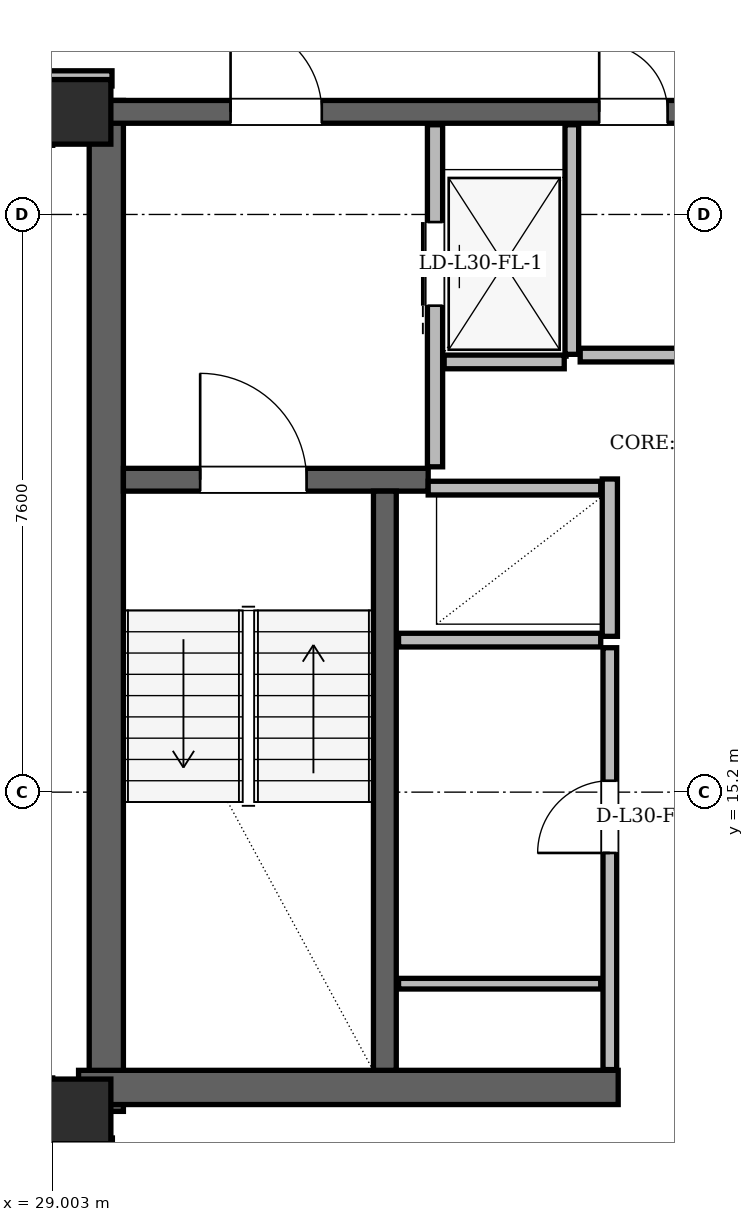
"""IFC4 building model, lengths in metres.
Left out: names, types, materials, properties, quantities, classifications, styles, units other than length and angle.
Written with IfcOpenShell. Run it as: python <this file> out.ifc"""

import sys

from ifc_helpers import new_model, si_unit, direction, frame, frame_2d, origin, origin_2d, place, context, subcontext, project, spatial, rectangle, hollow_rectangle, extrude, element, fill, save


model = new_model("IFC4")
c1 = context("Model", 3, precision=1e-05, world=origin(), true_north=direction((0.0, 1.0)))
c2 = subcontext(c1, "Body", "Model", "MODEL_VIEW")
j1 = project(units=[si_unit("LENGTHUNIT", "METRE"), si_unit("PLANEANGLEUNIT", "RADIAN")], contexts=[c1])
p1 = place(None, origin())
s1 = spatial("IfcSite", under=j1, at=p1, CompositionType="ELEMENT")
p2 = place(p1, origin())
s2 = spatial("IfcBuilding", under=s1, at=p2, CompositionType="ELEMENT")
p3 = place(p2, frame((0.0, 0.0, 115.8)))
s3 = spatial("IfcBuildingStorey", under=s2, at=p3, CompositionType="ELEMENT", Elevation=115.8)
for number, where, z_axis, x_axis in (
    (1, (29.35, 11.0, 0.0), (0.0, 0.0, 1.0), (1.0, 0.0, 0.0)),
    (2, (29.35, 24.15, 0.0), (0.0, 0.0, 1.0), (1.0, 0.0, 0.0)),
):
    element("IfcColumn", number, at=place(p3, frame(where, z_axis=z_axis, x_axis=x_axis)), inside=s3, PredefinedType="COLUMN", context=c2, shape_type="SweptSolid", body=[
        extrude(hollow_rectangle(XDim=0.85, YDim=0.85, WallThickness=0.07, at=origin_2d()), origin(), (0.0, 0.0, 1.0), 3.6),
    ])
p4 = place(p3, frame((29.715, 11.0, 0.0), z_axis=(0.0, 0.0, 1.0), x_axis=(0.0, 1.0, 0.0)))
e3 = element("IfcWall", 3, at=p4, inside=s3, PredefinedType="SHEAR", context=c2, shape_type="SweptSolid", body=[
    extrude(rectangle(XDim=13.3, YDim=0.45, at=frame_2d((6.65, 0.0))), origin(), (0.0, 0.0, 1.0), 3.36),
])
p5 = place(p3, frame((29.35, 11.315, 0.0), z_axis=(0.0, 0.0, 1.0), x_axis=(1.0, 0.0, 0.0)))
e4 = element("IfcWall", 4, at=p5, inside=s3, PredefinedType="SHEAR", context=c2, shape_type="SweptSolid", body=[
    extrude(rectangle(XDim=7.1, YDim=0.45, at=frame_2d((3.55, 0.0))), origin(), (0.0, 0.0, 1.0), 3.36),
])
p6 = place(p3, frame((29.65, 24.15, 0.0), z_axis=(0.0, 0.0, 1.0), x_axis=(1.0, 0.0, 0.0)))
e5 = element("IfcWall", 5, at=p6, inside=s3, PredefinedType="SHEAR", context=c2, shape_type="SweptSolid", body=[
    extrude(rectangle(XDim=15.7, YDim=0.3, at=frame_2d((7.85, 0.0))), origin(), (0.0, 0.0, 1.0), 3.36),
])
p7 = place(p6, frame((1.7, 0.0, 0.0)))
e6 = element("IfcOpeningElement", 6, at=p7, cuts=e5, PredefinedType="OPENING", context=c2, shape_type="SweptSolid", body=[
    extrude(rectangle(XDim=1.2, YDim=2.2, at=frame_2d((0.6, 1.1))), frame((0.0, 0.15, 0.0), z_axis=(0.0, -1.0, 0.0), x_axis=(1.0, 0.0, 0.0)), (0.0, 0.0, 1.0), 0.3),
])
p8 = place(p6, frame((12.8, 0.0, 0.0)))
e7 = element("IfcOpeningElement", 7, at=p8, cuts=e5, PredefinedType="OPENING", context=c2, shape_type="SweptSolid", body=[
    extrude(rectangle(XDim=1.2, YDim=2.2, at=frame_2d((0.6, 1.1))), frame((0.0, 0.15, 0.0), z_axis=(0.0, -1.0, 0.0), x_axis=(1.0, 0.0, 0.0)), (0.0, 0.0, 1.0), 0.3),
])
p9 = place(p6, frame((6.55, 0.0, 0.0)))
e8 = element("IfcOpeningElement", 8, at=p9, cuts=e5, PredefinedType="OPENING", context=c2, shape_type="SweptSolid", body=[
    extrude(rectangle(XDim=0.9, YDim=2.05, at=frame_2d((0.45, 1.025))), frame((0.0, 0.15, 0.0), z_axis=(0.0, -1.0, 0.0), x_axis=(1.0, 0.0, 0.0)), (0.0, 0.0, 1.0), 0.3),
])
p10 = place(p6, frame((8.45, 0.0, 0.0)))
e9 = element("IfcOpeningElement", 9, at=p10, cuts=e5, PredefinedType="OPENING", context=c2, shape_type="SweptSolid", body=[
    extrude(rectangle(XDim=0.9, YDim=2.05, at=frame_2d((0.45, 1.025))), frame((0.0, 0.15, 0.0), z_axis=(0.0, -1.0, 0.0), x_axis=(1.0, 0.0, 0.0)), (0.0, 0.0, 1.0), 0.3),
])
p11 = place(p3, frame((29.94, 19.31, 0.0), z_axis=(0.0, 0.0, 1.0), x_axis=(1.0, 0.0, 0.0)))
e10 = element("IfcWall", 10, at=p11, inside=s3, PredefinedType="SHEAR", context=c2, shape_type="SweptSolid", body=[
    extrude(rectangle(XDim=4.01, YDim=0.3, at=frame_2d((2.005, 0.0))), origin(), (0.0, 0.0, 1.0), 3.36),
])
p12 = place(p11, frame((1.01, 0.0, 0.0)))
e11 = element("IfcOpeningElement", 11, at=p12, cuts=e10, PredefinedType="OPENING", context=c2, shape_type="SweptSolid", body=[
    extrude(rectangle(XDim=1.4, YDim=2.2, at=frame_2d((0.7, 1.1))), frame((0.0, 0.15, 0.0), z_axis=(0.0, -1.0, 0.0), x_axis=(1.0, 0.0, 0.0)), (0.0, 0.0, 1.0), 0.3),
])
p13 = place(p3, frame((33.38, 11.54, 0.0), z_axis=(0.0, 0.0, 1.0), x_axis=(0.0, 1.0, 0.0)))
e12 = element("IfcWall", 12, at=p13, inside=s3, PredefinedType="SHEAR", context=c2, shape_type="SweptSolid", body=[
    extrude(rectangle(XDim=7.62, YDim=0.3, at=frame_2d((3.81, 0.0))), origin(), (0.0, 0.0, 1.0), 3.36),
])
p14 = place(p3, frame((34.04, 19.48, 0.0), z_axis=(0.0, 0.0, 1.0), x_axis=(0.0, 1.0, 0.0)))
e13 = element("IfcWall", 13, at=p14, inside=s3, PredefinedType="PARTITIONING", context=c2, shape_type="SweptSolid", body=[
    extrude(rectangle(XDim=4.5, YDim=0.2, at=frame_2d((2.25, 0.0))), origin(), (0.0, 0.0, 1.0), 2.4),
])
p15 = place(p14, frame((2.12, 0.0, 0.0)))
e14 = element("IfcOpeningElement", 14, at=p15, cuts=e13, PredefinedType="OPENING", context=c2, shape_type="SweptSolid", body=[
    extrude(rectangle(XDim=1.1, YDim=2.2, at=frame_2d((0.55, 1.1))), frame((0.0, 0.1, 0.0), z_axis=(0.0, -1.0, 0.0), x_axis=(1.0, 0.0, 0.0)), (0.0, 0.0, 1.0), 0.2),
])
p16 = place(p3, frame((35.84, 20.96, 0.0), z_axis=(0.0, 0.0, 1.0), x_axis=(0.0, 1.0, 0.0)))
e15 = element("IfcWall", 15, at=p16, inside=s3, PredefinedType="PARTITIONING", context=c2, shape_type="SweptSolid", body=[
    extrude(rectangle(XDim=3.02, YDim=0.18, at=frame_2d((1.51, 0.0))), origin(), (0.0, 0.0, 1.0), 2.4),
])
p17 = place(p3, frame((34.16, 20.86, 0.0), z_axis=(0.0, 0.0, 1.0), x_axis=(1.0, 0.0, 0.0)))
e16 = element("IfcWall", 16, at=p17, inside=s3, PredefinedType="PARTITIONING", context=c2, shape_type="SweptSolid", body=[
    extrude(rectangle(XDim=1.58, YDim=0.18, at=frame_2d((0.79, 0.0))), origin(), (0.0, 0.0, 1.0), 3.36),
])
p18 = place(p3, frame((36.34, 17.25, 0.0), z_axis=(0.0, 0.0, 1.0), x_axis=(0.0, 1.0, 0.0)))
e17 = element("IfcWall", 17, at=p18, inside=s3, PredefinedType="PARTITIONING", context=c2, shape_type="SweptSolid", body=[
    extrude(rectangle(XDim=2.07, YDim=0.2, at=frame_2d((1.035, 0.0))), origin(), (0.0, 0.0, 1.0), 3.36),
])
p19 = place(p3, frame((33.95, 19.2, 0.0), z_axis=(0.0, 0.0, 1.0), x_axis=(1.0, 0.0, 0.0)))
e18 = element("IfcWall", 18, at=p19, inside=s3, PredefinedType="PARTITIONING", context=c2, shape_type="SweptSolid", body=[
    extrude(rectangle(XDim=2.27, YDim=0.18, at=frame_2d((1.135, 0.0))), origin(), (0.0, 0.0, 1.0), 3.36),
])
p20 = place(p3, frame((33.56, 17.2, 0.0), z_axis=(0.0, 0.0, 1.0), x_axis=(1.0, 0.0, 0.0)))
e19 = element("IfcWall", 19, at=p20, inside=s3, PredefinedType="PARTITIONING", context=c2, shape_type="SweptSolid", body=[
    extrude(rectangle(XDim=2.66, YDim=0.18, at=frame_2d((1.33, 0.0))), origin(), (0.0, 0.0, 1.0), 3.36),
])
p21 = place(p3, frame((36.34, 11.55, 0.0), z_axis=(0.0, 0.0, 1.0), x_axis=(0.0, 1.0, 0.0)))
e20 = element("IfcWall", 20, at=p21, inside=s3, PredefinedType="PARTITIONING", context=c2, shape_type="SweptSolid", body=[
    extrude(rectangle(XDim=5.55, YDim=0.18, at=frame_2d((2.775, 0.0))), origin(), (0.0, 0.0, 1.0), 3.36),
])
p22 = place(p21, frame((2.85, 0.0, 0.0)))
e21 = element("IfcOpeningElement", 21, at=p22, cuts=e20, PredefinedType="OPENING", context=c2, shape_type="SweptSolid", body=[
    extrude(rectangle(XDim=0.95, YDim=2.1, at=frame_2d((0.475, 1.05))), frame((0.0, 0.09, 0.0), z_axis=(0.0, -1.0, 0.0), x_axis=(1.0, 0.0, 0.0)), (0.0, 0.0, 1.0), 0.18),
])
p23 = place(p3, frame((33.56, 12.68, 0.0), z_axis=(0.0, 0.0, 1.0), x_axis=(1.0, 0.0, 0.0)))
e22 = element("IfcWall", 22, at=p23, inside=s3, PredefinedType="PARTITIONING", context=c2, shape_type="SweptSolid", body=[
    extrude(rectangle(XDim=2.66, YDim=0.14, at=frame_2d((1.33, 0.0))), origin(), (0.0, 0.0, 1.0), 3.36),
])
p24 = place(p3, frame((35.95, 20.95, 0.0), z_axis=(0.0, 0.0, 1.0), x_axis=(1.0, 0.0, 0.0)))
e23 = element("IfcWall", 23, at=p24, inside=s3, PredefinedType="PARTITIONING", context=c2, shape_type="SweptSolid", body=[
    extrude(rectangle(XDim=3.1, YDim=0.18, at=frame_2d((1.55, 0.0))), origin(), (0.0, 0.0, 1.0), 3.36),
])
p25 = place(p3, frame((28.905, 10.55, 0.0), z_axis=(0.0, 0.0, 1.0), x_axis=(1.0, 0.0, 0.0)))
e24 = element("IfcWall", 24, at=p25, inside=s3, PredefinedType="PARTITIONING", context=c2, shape_type="SweptSolid", body=[
    extrude(rectangle(XDim=0.89, YDim=0.2, at=frame_2d((0.445, 0.0))), origin(), (0.0, 0.0, 1.0), 3.36),
])
p26 = place(p3, frame((28.91, 24.59, 0.0), z_axis=(0.0, 0.0, 1.0), x_axis=(1.0, 0.0, 0.0)))
e25 = element("IfcWall", 25, at=p26, inside=s3, PredefinedType="PARTITIONING", context=c2, shape_type="SweptSolid", body=[
    extrude(rectangle(XDim=0.88, YDim=0.2, at=frame_2d((0.44, 0.0))), origin(), (0.0, 0.0, 1.0), 2.814),
])
p27 = place(p3, frame((28.91, 10.654, 0.0), z_axis=(0.0, 0.0, 1.0), x_axis=(0.0, 1.0, 0.0)))
e26 = element("IfcWall", 26, at=p27, inside=s3, PredefinedType="PARTITIONING", context=c2, shape_type="SweptSolid", body=[
    extrude(rectangle(XDim=0.786, YDim=0.2, at=frame_2d((0.393, 0.0))), origin(), (0.0, 0.0, 1.0), 2.814),
])
p28 = place(p3, frame((28.91, 23.71, 0.0), z_axis=(0.0, 0.0, 1.0), x_axis=(0.0, 1.0, 0.0)))
e27 = element("IfcWall", 27, at=p28, inside=s3, PredefinedType="PARTITIONING", context=c2, shape_type="SweptSolid", body=[
    extrude(rectangle(XDim=0.61, YDim=0.2, at=frame_2d((0.305, 0.0))), origin(), (0.0, 0.0, 1.0), 3.36),
])
p29 = place(p22, origin())
e28 = element("IfcDoor", 28, at=p29, inside=s3, OperationType="SINGLE_SWING_LEFT", PredefinedType="DOOR", context=c2, shape_type="SweptSolid", body=[
    extrude(rectangle(XDim=0.95, YDim=2.1, at=frame_2d((0.475, 1.05))), frame((0.0, 0.025, 0.0), z_axis=(0.0, -1.0, 0.0), x_axis=(1.0, 0.0, 0.0)), (0.0, 0.0, 1.0), 0.05),
])
fill(e21, e28)
p30 = place(p15, origin())
e29 = element("IfcDoor", 29, at=p30, inside=s3, OperationType="SLIDING_TO_LEFT", PredefinedType="DOOR", context=c2, shape_type="SweptSolid", body=[
    extrude(rectangle(XDim=1.1, YDim=2.2, at=frame_2d((0.55, 1.1))), frame((0.0, 0.025, 0.0), z_axis=(0.0, -1.0, 0.0), x_axis=(1.0, 0.0, 0.0)), (0.0, 0.0, 1.0), 0.05),
])
fill(e14, e29)
p31 = place(p12, origin())
e30 = element("IfcDoor", 30, at=p31, inside=s3, OperationType="SINGLE_SWING_LEFT", PredefinedType="DOOR", context=c2, shape_type="SweptSolid", body=[
    extrude(rectangle(XDim=1.4, YDim=2.2, at=frame_2d((0.7, 1.1))), frame((0.0, 0.025, 0.0), z_axis=(0.0, -1.0, 0.0), x_axis=(1.0, 0.0, 0.0)), (0.0, 0.0, 1.0), 0.05),
])
fill(e11, e30)
p32 = place(p7, origin())
e31 = element("IfcDoor", 31, at=p32, inside=s3, OperationType="SINGLE_SWING_LEFT", PredefinedType="DOOR", context=c2, shape_type="SweptSolid", body=[
    extrude(rectangle(XDim=1.2, YDim=2.2, at=frame_2d((0.6, 1.1))), frame((0.0, 0.025, 0.0), z_axis=(0.0, -1.0, 0.0), x_axis=(1.0, 0.0, 0.0)), (0.0, 0.0, 1.0), 0.05),
])
fill(e6, e31)
p33 = place(p9, origin())
e32 = element("IfcDoor", 32, at=p33, inside=s3, OperationType="SINGLE_SWING_LEFT", PredefinedType="DOOR", context=c2, shape_type="SweptSolid", body=[
    extrude(rectangle(XDim=0.9, YDim=2.05, at=frame_2d((0.45, 1.025))), frame((0.0, 0.025, 0.0), z_axis=(0.0, -1.0, 0.0), x_axis=(1.0, 0.0, 0.0)), (0.0, 0.0, 1.0), 0.05),
])
fill(e8, e32)
save(model, sys.argv[1])
